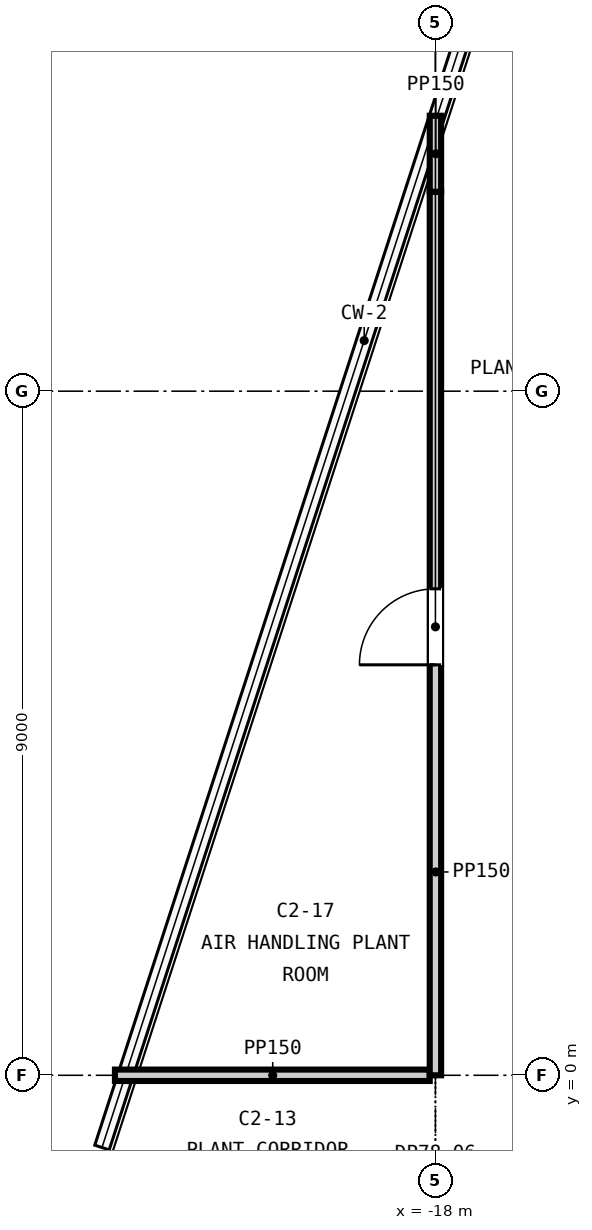
"""IFC4 building model, lengths in metres.
Left out: names, types, materials, properties, quantities, classifications, styles, units other than length and angle.
Written with IfcOpenShell. Run it as: python <this file> out.ifc"""

import sys

from ifc_helpers import new_model, si_unit, direction, frame, frame_2d, origin, place, context, subcontext, project, spatial, rectangle, extrude, element, fill, save


model = new_model("IFC4")
c1 = context("Model", 3, precision=1e-05, world=origin(), true_north=direction((0.0, 1.0)))
c2 = subcontext(c1, "Body", "Model", "MODEL_VIEW")
j1 = project(units=[si_unit("LENGTHUNIT", "METRE"), si_unit("PLANEANGLEUNIT", "RADIAN")], contexts=[c1])
p1 = place(None, origin())
s1 = spatial("IfcSite", under=j1, at=p1, CompositionType="ELEMENT")
p2 = place(p1, origin())
s2 = spatial("IfcBuilding", under=s1, at=p2, CompositionType="ELEMENT")
p3 = place(p2, frame((0.0, 0.0, 306.1)))
s3 = spatial("IfcBuildingStorey", under=s2, at=p3, CompositionType="ELEMENT", Elevation=306.1)
p4 = place(p3, frame((-22.216, 0.0, 0.0), z_axis=(0.0, 0.0, 1.0), x_axis=(1.0, 0.0, 0.0)))
e1 = element("IfcWall", 1, at=p4, inside=s3, PredefinedType="PARTITIONING", context=c2, shape_type="SweptSolid", body=[
    extrude(rectangle(XDim=4.141, YDim=0.15, at=frame_2d((2.071, 0.0))), origin(), (0.0, 0.0, 1.0), 4.75),
])
p5 = place(p3, frame((-18.0, 0.0, 0.0), z_axis=(0.0, 0.0, 1.0), x_axis=(0.0, 1.0, 0.0)))
e2 = element("IfcWall", 2, at=p5, inside=s3, PredefinedType="PARTITIONING", context=c2, shape_type="SweptSolid", body=[
    extrude(rectangle(XDim=11.624, YDim=0.15, at=frame_2d((5.812, 0.0))), origin(), (0.0, 0.0, 1.0), 4.75),
])
p6 = place(p5, frame((5.4, 0.0, 0.0)))
e3 = element("IfcOpeningElement", 3, at=p6, cuts=e2, PredefinedType="OPENING", context=c2, shape_type="SweptSolid", body=[
    extrude(rectangle(XDim=1.0, YDim=2.1, at=frame_2d((0.5, 1.05))), frame((0.0, 0.085, 0.0), z_axis=(0.0, -1.0, 0.0), x_axis=(1.0, 0.0, 0.0)), (0.0, 0.0, 1.0), 0.17),
])
p7 = place(p3, frame((-18.0, 11.624, 0.0), z_axis=(0.0, 0.0, 1.0), x_axis=(0.0, 1.0, 0.0)))
e4 = element("IfcWall", 4, at=p7, inside=s3, PredefinedType="PARTITIONING", context=c2, shape_type="SweptSolid", body=[
    extrude(rectangle(XDim=1.0, YDim=0.15, at=frame_2d((0.5, 0.0))), origin(), (0.0, 0.0, 1.0), 4.134),
])
p8 = place(p6, origin())
e5 = element("IfcDoor", 5, at=p8, inside=s3, OperationType="SINGLE_SWING_LEFT", PredefinedType="DOOR", context=c2, shape_type="SweptSolid", body=[
    extrude(rectangle(XDim=1.0, YDim=2.1, at=frame_2d((0.5, 1.05))), frame((0.0, 0.025, 0.0), z_axis=(0.0, -1.0, 0.0), x_axis=(1.0, 0.0, 0.0)), (0.0, 0.0, 1.0), 0.05),
])
fill(e3, e5)
save(model, sys.argv[1])
